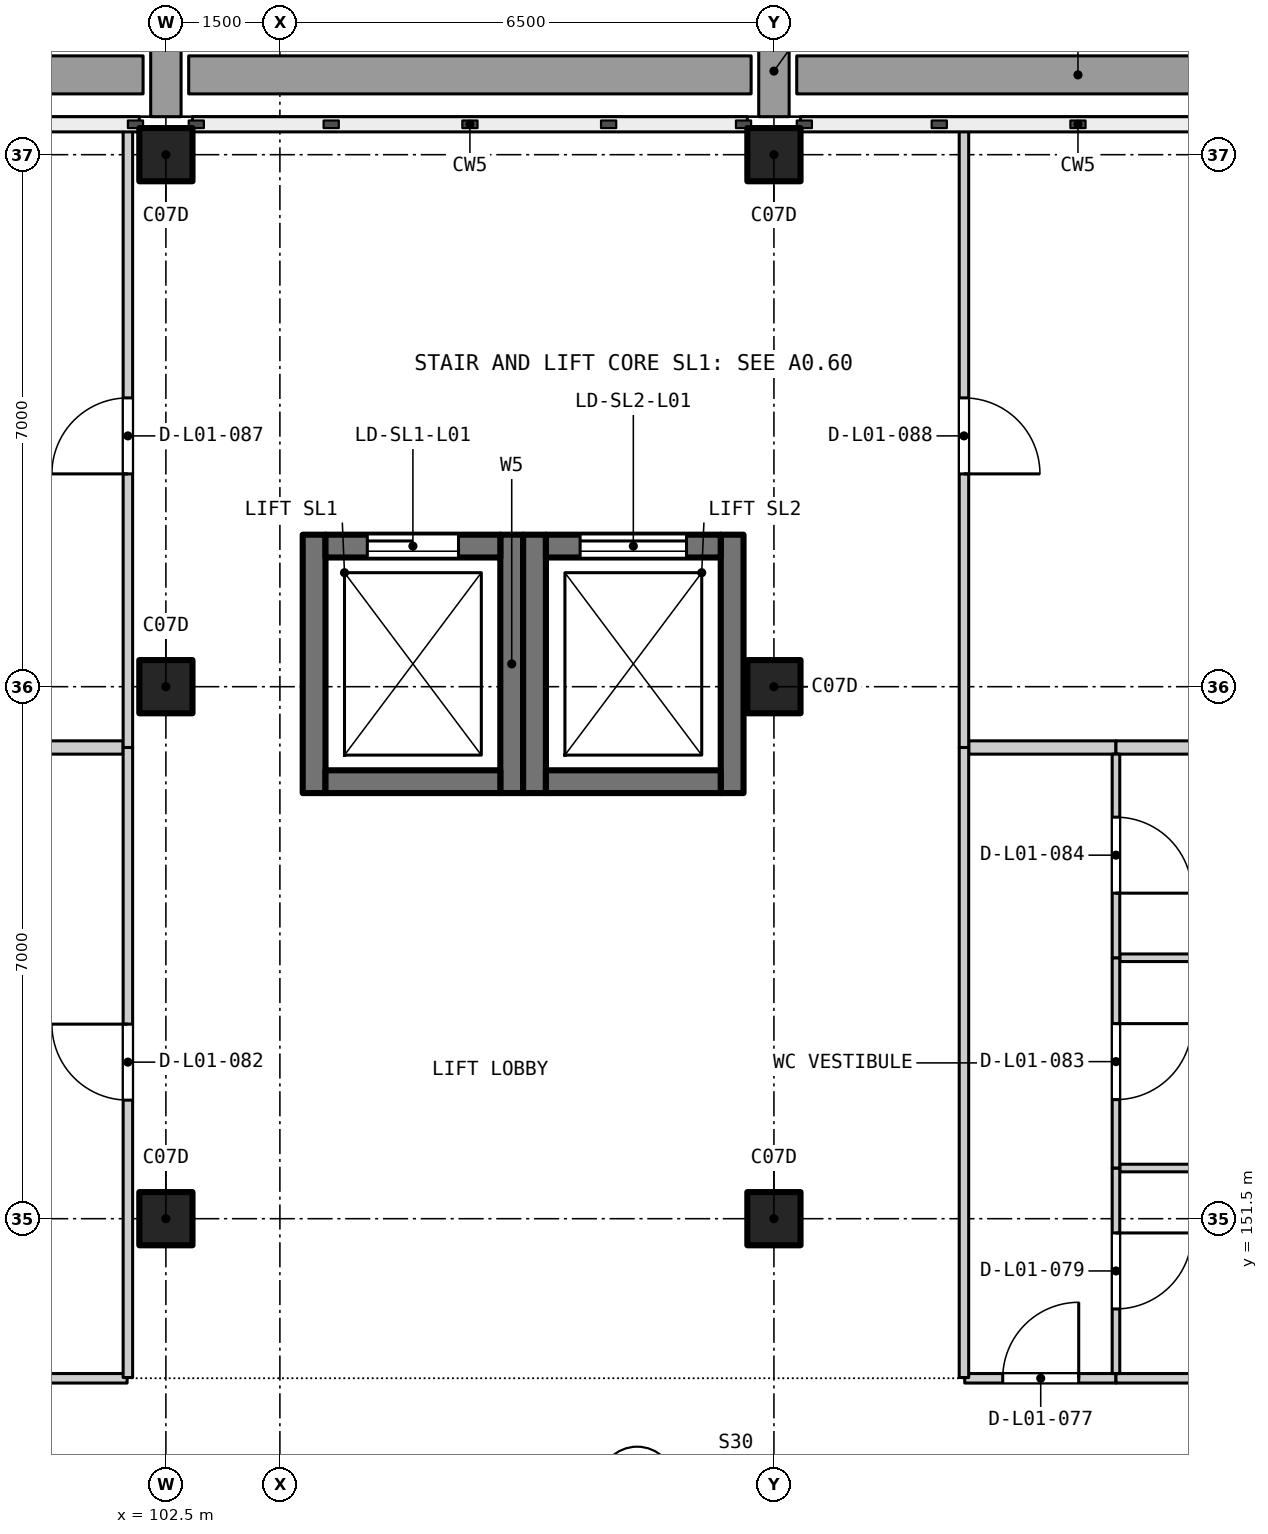
"""IFC4 building model, lengths in metres.
Left out: names, types, materials, properties, quantities, classifications, styles, units other than length and angle.
Written with IfcOpenShell. Run it as: python <this file> out.ifc"""

import sys

from ifc_helpers import new_model, si_unit, direction, frame, frame_2d, origin, origin_2d, place, context, subcontext, project, spatial, rectangle, extrude, element, fill, save


model = new_model("IFC4")
c1 = context("Model", 3, precision=1e-05, world=origin(), true_north=direction((0.0, 1.0)))
c2 = subcontext(c1, "Body", "Model", "MODEL_VIEW")
j1 = project(units=[si_unit("LENGTHUNIT", "METRE"), si_unit("PLANEANGLEUNIT", "RADIAN")], contexts=[c1])
p1 = place(None, origin())
s1 = spatial("IfcSite", under=j1, at=p1, CompositionType="ELEMENT")
p2 = place(p1, origin())
s2 = spatial("IfcBuilding", under=s1, at=p2, CompositionType="ELEMENT")
p3 = place(p2, frame((0.0, 0.0, 6.0)))
s3 = spatial("IfcBuildingStorey", under=s2, at=p3, CompositionType="ELEMENT", Elevation=6.0)
for number, where, z_axis, x_axis in (
    (1, (102.5, 151.5, 0.0), (0.0, 0.0, 1.0), (1.0, 0.0, 0.0)),
    (2, (102.5, 158.5, 0.0), (0.0, 0.0, 1.0), (1.0, 0.0, 0.0)),
    (3, (102.5, 165.5, 0.0), (0.0, 0.0, 1.0), (1.0, 0.0, 0.0)),
    (4, (110.5, 151.5, 0.0), (0.0, 0.0, 1.0), (1.0, 0.0, 0.0)),
    (5, (110.5, 158.5, 0.0), (0.0, 0.0, 1.0), (1.0, 0.0, 0.0)),
    (6, (110.5, 165.5, 0.0), (0.0, 0.0, 1.0), (1.0, 0.0, 0.0)),
):
    element("IfcColumn", number, at=place(p3, frame(where, z_axis=z_axis, x_axis=x_axis)), inside=s3, PredefinedType="COLUMN", context=c2, shape_type="SweptSolid", body=[
        extrude(rectangle(XDim=0.7, YDim=0.7, at=origin_2d()), origin(), (0.0, 0.0, 1.0), 4.2),
    ])
for number, where, z_axis, x_axis in (
    (7, (104.45, 157.1, 0.0), (0.0, 0.0, 1.0), (0.0, 1.0, 0.0)),
    (8, (107.05, 157.1, 0.0), (0.0, 0.0, 1.0), (0.0, 1.0, 0.0)),
):
    element("IfcWall", number, at=place(p3, frame(where, z_axis=z_axis, x_axis=x_axis)), inside=s3, PredefinedType="SHEAR", context=c2, shape_type="SweptSolid", body=[
        extrude(rectangle(XDim=3.4, YDim=0.3, at=frame_2d((1.7, 0.0))), origin(), (0.0, 0.0, 1.0), 4.2),
    ])
p4 = place(p3, frame((104.6, 157.25, 0.0), z_axis=(0.0, 0.0, 1.0), x_axis=(1.0, 0.0, 0.0)))
e9 = element("IfcWall", 9, at=p4, inside=s3, PredefinedType="SHEAR", context=c2, shape_type="SweptSolid", body=[
    extrude(rectangle(XDim=2.3, YDim=0.3, at=frame_2d((1.15, 0.0))), origin(), (0.0, 0.0, 1.0), 4.2),
])
p5 = place(p3, frame((104.6, 160.35, 0.0), z_axis=(0.0, 0.0, 1.0), x_axis=(1.0, 0.0, 0.0)))
e10 = element("IfcWall", 10, at=p5, inside=s3, PredefinedType="SHEAR", context=c2, shape_type="SweptSolid", body=[
    extrude(rectangle(XDim=2.3, YDim=0.3, at=frame_2d((1.15, 0.0))), origin(), (0.0, 0.0, 1.0), 4.2),
])
p6 = place(p5, frame((0.55, 0.0, 0.0)))
e11 = element("IfcOpeningElement", 11, at=p6, cuts=e10, PredefinedType="OPENING", context=c2, shape_type="SweptSolid", body=[
    extrude(rectangle(XDim=1.2, YDim=2.1, at=frame_2d((0.6, 1.05))), frame((0.0, 0.16, 0.0), z_axis=(0.0, -1.0, 0.0), x_axis=(1.0, 0.0, 0.0)), (0.0, 0.0, 1.0), 0.32),
])
for number, where, z_axis, x_axis in (
    (12, (107.35, 157.1, 0.0), (0.0, 0.0, 1.0), (0.0, 1.0, 0.0)),
    (13, (109.95, 157.1, 0.0), (0.0, 0.0, 1.0), (0.0, 1.0, 0.0)),
):
    element("IfcWall", number, at=place(p3, frame(where, z_axis=z_axis, x_axis=x_axis)), inside=s3, PredefinedType="SHEAR", context=c2, shape_type="SweptSolid", body=[
        extrude(rectangle(XDim=3.4, YDim=0.3, at=frame_2d((1.7, 0.0))), origin(), (0.0, 0.0, 1.0), 4.2),
    ])
p7 = place(p3, frame((107.5, 157.25, 0.0), z_axis=(0.0, 0.0, 1.0), x_axis=(1.0, 0.0, 0.0)))
e14 = element("IfcWall", 14, at=p7, inside=s3, PredefinedType="SHEAR", context=c2, shape_type="SweptSolid", body=[
    extrude(rectangle(XDim=2.3, YDim=0.3, at=frame_2d((1.15, 0.0))), origin(), (0.0, 0.0, 1.0), 4.2),
])
p8 = place(p3, frame((107.5, 160.35, 0.0), z_axis=(0.0, 0.0, 1.0), x_axis=(1.0, 0.0, 0.0)))
e15 = element("IfcWall", 15, at=p8, inside=s3, PredefinedType="SHEAR", context=c2, shape_type="SweptSolid", body=[
    extrude(rectangle(XDim=2.3, YDim=0.3, at=frame_2d((1.15, 0.0))), origin(), (0.0, 0.0, 1.0), 4.2),
])
p9 = place(p8, frame((0.45, 0.0, 0.0)))
e16 = element("IfcOpeningElement", 16, at=p9, cuts=e15, PredefinedType="OPENING", context=c2, shape_type="SweptSolid", body=[
    extrude(rectangle(XDim=1.4, YDim=2.1, at=frame_2d((0.7, 1.05))), frame((0.0, 0.16, 0.0), z_axis=(0.0, -1.0, 0.0), x_axis=(1.0, 0.0, 0.0)), (0.0, 0.0, 1.0), 0.32),
])
p10 = place(p3, frame((89.61, 149.4, 0.0), z_axis=(0.0, 0.0, 1.0), x_axis=(1.0, 0.0, 0.0)))
e17 = element("IfcWall", 17, at=p10, inside=s3, PredefinedType="PARTITIONING", context=c2, shape_type="SweptSolid", body=[
    extrude(rectangle(XDim=12.38, YDim=0.125, at=frame_2d((6.19, 0.0))), origin(), (0.0, 0.0, 1.0), 3.9),
])
p11 = place(p10, frame((5.7, 0.0, 0.0)))
e18 = element("IfcOpeningElement", 18, at=p11, cuts=e17, PredefinedType="OPENING", context=c2, shape_type="SweptSolid", body=[
    extrude(rectangle(XDim=1.0, YDim=2.1, at=frame_2d((0.5, 1.05))), frame((0.0, 0.073, 0.0), z_axis=(0.0, -1.0, 0.0), x_axis=(1.0, 0.0, 0.0)), (0.0, 0.0, 1.0), 0.145),
])
p12 = place(p3, frame((113.01, 149.4, 0.0), z_axis=(0.0, 0.0, 1.0), x_axis=(1.0, 0.0, 0.0)))
e19 = element("IfcWall", 19, at=p12, inside=s3, PredefinedType="PARTITIONING", context=c2, shape_type="SweptSolid", body=[
    extrude(rectangle(XDim=1.99, YDim=0.125, at=frame_2d((0.995, 0.0))), origin(), (0.0, 0.0, 1.0), 3.9),
])
p13 = place(p12, frame((0.5, 0.0, 0.0)))
e20 = element("IfcOpeningElement", 20, at=p13, cuts=e19, PredefinedType="OPENING", context=c2, shape_type="SweptSolid", body=[
    extrude(rectangle(XDim=1.0, YDim=2.1, at=frame_2d((0.5, 1.05))), frame((0.0, 0.073, 0.0), z_axis=(0.0, -1.0, 0.0), x_axis=(1.0, 0.0, 0.0)), (0.0, 0.0, 1.0), 0.145),
])
p14 = place(p3, frame((115.0, 149.4, 0.0), z_axis=(0.0, 0.0, 1.0), x_axis=(1.0, 0.0, 0.0)))
e21 = element("IfcWall", 21, at=p14, inside=s3, PredefinedType="PARTITIONING", context=c2, shape_type="SweptSolid", body=[
    extrude(rectangle(XDim=5.6, YDim=0.125, at=frame_2d((2.8, 0.0))), origin(), (0.0, 0.0, 1.0), 3.9),
])
for number, where, z_axis, x_axis in (
    (22, (115.05, 152.167, 0.0), (0.0, 0.0, 1.0), (1.0, 0.0, 0.0)),
    (23, (115.05, 154.933, 0.0), (0.0, 0.0, 1.0), (1.0, 0.0, 0.0)),
):
    element("IfcWall", number, at=place(p3, frame(where, z_axis=z_axis, x_axis=x_axis)), inside=s3, PredefinedType="PARTITIONING", context=c2, shape_type="SweptSolid", body=[
        extrude(rectangle(XDim=5.462, YDim=0.1, at=frame_2d((2.731, 0.0))), origin(), (0.0, 0.0, 1.0), 3.9),
    ])
p15 = place(p3, frame((89.663, 157.7, 0.0), z_axis=(0.0, 0.0, 1.0), x_axis=(1.0, 0.0, 0.0)))
e24 = element("IfcWall", 24, at=p15, inside=s3, PredefinedType="PARTITIONING", context=c2, shape_type="SweptSolid", body=[
    extrude(rectangle(XDim=12.275, YDim=0.175, at=frame_2d((6.137, 0.0))), origin(), (0.0, 0.0, 1.0), 3.9),
])
p16 = place(p15, frame((0.1, 0.0, 0.0)))
e25 = element("IfcOpeningElement", 25, at=p16, cuts=e24, PredefinedType="OPENING", context=c2, shape_type="SweptSolid", body=[
    extrude(rectangle(XDim=1.0, YDim=2.1, at=frame_2d((0.5, 1.05))), frame((0.0, 0.097, 0.0), z_axis=(0.0, -1.0, 0.0), x_axis=(1.0, 0.0, 0.0)), (0.0, 0.0, 1.0), 0.195),
])
p17 = place(p3, frame((113.062, 157.7, 0.0), z_axis=(0.0, 0.0, 1.0), x_axis=(1.0, 0.0, 0.0)))
e26 = element("IfcWall", 26, at=p17, inside=s3, PredefinedType="PARTITIONING", context=c2, shape_type="SweptSolid", body=[
    extrude(rectangle(XDim=1.938, YDim=0.175, at=frame_2d((0.969, 0.0))), origin(), (0.0, 0.0, 1.0), 3.9),
])
p18 = place(p3, frame((115.0, 157.7, 0.0), z_axis=(0.0, 0.0, 1.0), x_axis=(1.0, 0.0, 0.0)))
e27 = element("IfcWall", 27, at=p18, inside=s3, PredefinedType="PARTITIONING", context=c2, shape_type="SweptSolid", body=[
    extrude(rectangle(XDim=5.6, YDim=0.175, at=frame_2d((2.8, 0.0))), origin(), (0.0, 0.0, 1.0), 3.9),
])
p19 = place(p3, frame((102.0, 149.41, 0.0), z_axis=(0.0, 0.0, 1.0), x_axis=(0.0, 1.0, 0.0)))
e28 = element("IfcWall", 28, at=p19, inside=s3, PredefinedType="PARTITIONING", context=c2, shape_type="SweptSolid", body=[
    extrude(rectangle(XDim=8.29, YDim=0.125, at=frame_2d((4.145, 0.0))), origin(), (0.0, 0.0, 1.0), 3.9),
])
p20 = place(p19, frame((3.65, 0.0, 0.0)))
e29 = element("IfcOpeningElement", 29, at=p20, cuts=e28, PredefinedType="OPENING", context=c2, shape_type="SweptSolid", body=[
    extrude(rectangle(XDim=1.0, YDim=2.1, at=frame_2d((0.5, 1.05))), frame((0.0, 0.073, 0.0), z_axis=(0.0, -1.0, 0.0), x_axis=(1.0, 0.0, 0.0)), (0.0, 0.0, 1.0), 0.145),
])
p21 = place(p3, frame((102.0, 157.7, 0.0), z_axis=(0.0, 0.0, 1.0), x_axis=(0.0, 1.0, 0.0)))
e30 = element("IfcWall", 30, at=p21, inside=s3, PredefinedType="PARTITIONING", context=c2, shape_type="SweptSolid", body=[
    extrude(rectangle(XDim=8.15, YDim=0.125, at=frame_2d((4.075, 0.0))), origin(), (0.0, 0.0, 1.0), 3.9),
])
p22 = place(p21, frame((3.6, 0.0, 0.0)))
e31 = element("IfcOpeningElement", 31, at=p22, cuts=e30, PredefinedType="OPENING", context=c2, shape_type="SweptSolid", body=[
    extrude(rectangle(XDim=1.0, YDim=2.1, at=frame_2d((0.5, 1.05))), frame((0.0, 0.073, 0.0), z_axis=(0.0, -1.0, 0.0), x_axis=(1.0, 0.0, 0.0)), (0.0, 0.0, 1.0), 0.145),
])
p23 = place(p3, frame((113.0, 149.41, 0.0), z_axis=(0.0, 0.0, 1.0), x_axis=(0.0, 1.0, 0.0)))
e32 = element("IfcWall", 32, at=p23, inside=s3, PredefinedType="PARTITIONING", context=c2, shape_type="SweptSolid", body=[
    extrude(rectangle(XDim=8.29, YDim=0.125, at=frame_2d((4.145, 0.0))), origin(), (0.0, 0.0, 1.0), 3.9),
])
p24 = place(p3, frame((113.0, 157.7, 0.0), z_axis=(0.0, 0.0, 1.0), x_axis=(0.0, 1.0, 0.0)))
e33 = element("IfcWall", 33, at=p24, inside=s3, PredefinedType="PARTITIONING", context=c2, shape_type="SweptSolid", body=[
    extrude(rectangle(XDim=8.15, YDim=0.125, at=frame_2d((4.075, 0.0))), origin(), (0.0, 0.0, 1.0), 3.9),
])
p25 = place(p24, frame((3.6, 0.0, 0.0)))
e34 = element("IfcOpeningElement", 34, at=p25, cuts=e33, PredefinedType="OPENING", context=c2, shape_type="SweptSolid", body=[
    extrude(rectangle(XDim=1.0, YDim=2.1, at=frame_2d((0.5, 1.05))), frame((0.0, 0.073, 0.0), z_axis=(0.0, -1.0, 0.0), x_axis=(1.0, 0.0, 0.0)), (0.0, 0.0, 1.0), 0.145),
])
p26 = place(p3, frame((115.0, 149.462, 0.0), z_axis=(0.0, 0.0, 1.0), x_axis=(0.0, 1.0, 0.0)))
e35 = element("IfcWall", 35, at=p26, inside=s3, PredefinedType="PARTITIONING", context=c2, shape_type="SweptSolid", body=[
    extrude(rectangle(XDim=2.704, YDim=0.1, at=frame_2d((1.352, 0.0))), origin(), (0.0, 0.0, 1.0), 3.9),
])
p27 = place(p26, frame((0.85, 0.0, 0.0)))
e36 = element("IfcOpeningElement", 36, at=p27, cuts=e35, PredefinedType="OPENING", context=c2, shape_type="SweptSolid", body=[
    extrude(rectangle(XDim=1.0, YDim=2.1, at=frame_2d((0.5, 1.05))), frame((0.0, 0.06, 0.0), z_axis=(0.0, -1.0, 0.0), x_axis=(1.0, 0.0, 0.0)), (0.0, 0.0, 1.0), 0.12),
])
p28 = place(p3, frame((115.0, 152.167, 0.0), z_axis=(0.0, 0.0, 1.0), x_axis=(0.0, 1.0, 0.0)))
e37 = element("IfcWall", 37, at=p28, inside=s3, PredefinedType="PARTITIONING", context=c2, shape_type="SweptSolid", body=[
    extrude(rectangle(XDim=2.767, YDim=0.1, at=frame_2d((1.383, 0.0))), origin(), (0.0, 0.0, 1.0), 3.9),
])
p29 = place(p28, frame((0.9, 0.0, 0.0)))
e38 = element("IfcOpeningElement", 38, at=p29, cuts=e37, PredefinedType="OPENING", context=c2, shape_type="SweptSolid", body=[
    extrude(rectangle(XDim=1.0, YDim=2.1, at=frame_2d((0.5, 1.05))), frame((0.0, 0.06, 0.0), z_axis=(0.0, -1.0, 0.0), x_axis=(1.0, 0.0, 0.0)), (0.0, 0.0, 1.0), 0.12),
])
p30 = place(p3, frame((115.0, 154.933, 0.0), z_axis=(0.0, 0.0, 1.0), x_axis=(0.0, 1.0, 0.0)))
e39 = element("IfcWall", 39, at=p30, inside=s3, PredefinedType="PARTITIONING", context=c2, shape_type="SweptSolid", body=[
    extrude(rectangle(XDim=2.679, YDim=0.1, at=frame_2d((1.34, 0.0))), origin(), (0.0, 0.0, 1.0), 3.9),
])
p31 = place(p30, frame((0.85, 0.0, 0.0)))
e40 = element("IfcOpeningElement", 40, at=p31, cuts=e39, PredefinedType="OPENING", context=c2, shape_type="SweptSolid", body=[
    extrude(rectangle(XDim=1.0, YDim=2.1, at=frame_2d((0.5, 1.05))), frame((0.0, 0.06, 0.0), z_axis=(0.0, -1.0, 0.0), x_axis=(1.0, 0.0, 0.0)), (0.0, 0.0, 1.0), 0.12),
])
p32 = place(p13, origin())
e41 = element("IfcDoor", 41, at=p32, inside=s3, OperationType="SINGLE_SWING_RIGHT", PredefinedType="DOOR", context=c2, shape_type="SweptSolid", body=[
    extrude(rectangle(XDim=1.0, YDim=2.1, at=frame_2d((0.5, 1.05))), frame((0.0, 0.025, 0.0), z_axis=(0.0, -1.0, 0.0), x_axis=(1.0, 0.0, 0.0)), (0.0, 0.0, 1.0), 0.05),
])
fill(e20, e41)
p33 = place(p27, frame((1.0, 0.0, 0.0), z_axis=(0.0, 0.0, 1.0), x_axis=(-1.0, 0.0, 0.0)))
e42 = element("IfcDoor", 42, at=p33, inside=s3, OperationType="SINGLE_SWING_LEFT", PredefinedType="DOOR", context=c2, shape_type="SweptSolid", body=[
    extrude(rectangle(XDim=1.0, YDim=2.1, at=frame_2d((0.5, 1.05))), frame((0.0, 0.025, 0.0), z_axis=(0.0, -1.0, 0.0), x_axis=(1.0, 0.0, 0.0)), (0.0, 0.0, 1.0), 0.05),
])
fill(e36, e42)
p34 = place(p20, origin())
e43 = element("IfcDoor", 43, at=p34, inside=s3, OperationType="SINGLE_SWING_RIGHT", PredefinedType="DOOR", context=c2, shape_type="SweptSolid", body=[
    extrude(rectangle(XDim=1.0, YDim=2.1, at=frame_2d((0.5, 1.05))), frame((0.0, 0.025, 0.0), z_axis=(0.0, -1.0, 0.0), x_axis=(1.0, 0.0, 0.0)), (0.0, 0.0, 1.0), 0.05),
])
fill(e29, e43)
p35 = place(p29, frame((1.0, 0.0, 0.0), z_axis=(0.0, 0.0, 1.0), x_axis=(-1.0, 0.0, 0.0)))
e44 = element("IfcDoor", 44, at=p35, inside=s3, OperationType="SINGLE_SWING_LEFT", PredefinedType="DOOR", context=c2, shape_type="SweptSolid", body=[
    extrude(rectangle(XDim=1.0, YDim=2.1, at=frame_2d((0.5, 1.05))), frame((0.0, 0.025, 0.0), z_axis=(0.0, -1.0, 0.0), x_axis=(1.0, 0.0, 0.0)), (0.0, 0.0, 1.0), 0.05),
])
fill(e38, e44)
p36 = place(p31, frame((1.0, 0.0, 0.0), z_axis=(0.0, 0.0, 1.0), x_axis=(-1.0, 0.0, 0.0)))
e45 = element("IfcDoor", 45, at=p36, inside=s3, OperationType="SINGLE_SWING_RIGHT", PredefinedType="DOOR", context=c2, shape_type="SweptSolid", body=[
    extrude(rectangle(XDim=1.0, YDim=2.1, at=frame_2d((0.5, 1.05))), frame((0.0, 0.025, 0.0), z_axis=(0.0, -1.0, 0.0), x_axis=(1.0, 0.0, 0.0)), (0.0, 0.0, 1.0), 0.05),
])
fill(e40, e45)
p37 = place(p22, origin())
e46 = element("IfcDoor", 46, at=p37, inside=s3, OperationType="SINGLE_SWING_LEFT", PredefinedType="DOOR", context=c2, shape_type="SweptSolid", body=[
    extrude(rectangle(XDim=1.0, YDim=2.1, at=frame_2d((0.5, 1.05))), frame((0.0, 0.025, 0.0), z_axis=(0.0, -1.0, 0.0), x_axis=(1.0, 0.0, 0.0)), (0.0, 0.0, 1.0), 0.05),
])
fill(e31, e46)
p38 = place(p25, frame((1.0, 0.0, 0.0), z_axis=(0.0, 0.0, 1.0), x_axis=(-1.0, 0.0, 0.0)))
e47 = element("IfcDoor", 47, at=p38, inside=s3, OperationType="SINGLE_SWING_RIGHT", PredefinedType="DOOR", context=c2, shape_type="SweptSolid", body=[
    extrude(rectangle(XDim=1.0, YDim=2.1, at=frame_2d((0.5, 1.05))), frame((0.0, 0.025, 0.0), z_axis=(0.0, -1.0, 0.0), x_axis=(1.0, 0.0, 0.0)), (0.0, 0.0, 1.0), 0.05),
])
fill(e34, e47)
p39 = place(p6, origin())
e48 = element("IfcDoor", 48, at=p39, inside=s3, OperationType="SLIDING_TO_LEFT", PredefinedType="DOOR", context=c2, shape_type="SweptSolid", body=[
    extrude(rectangle(XDim=1.2, YDim=2.1, at=frame_2d((0.6, 1.05))), frame((0.0, 0.025, 0.0), z_axis=(0.0, -1.0, 0.0), x_axis=(1.0, 0.0, 0.0)), (0.0, 0.0, 1.0), 0.05),
])
fill(e11, e48)
p40 = place(p9, origin())
e49 = element("IfcDoor", 49, at=p40, inside=s3, OperationType="DOUBLE_DOOR_SLIDING", PredefinedType="DOOR", context=c2, shape_type="SweptSolid", body=[
    extrude(rectangle(XDim=1.4, YDim=2.1, at=frame_2d((0.7, 1.05))), frame((0.0, 0.025, 0.0), z_axis=(0.0, -1.0, 0.0), x_axis=(1.0, 0.0, 0.0)), (0.0, 0.0, 1.0), 0.05),
])
fill(e16, e49)
save(model, sys.argv[1])
